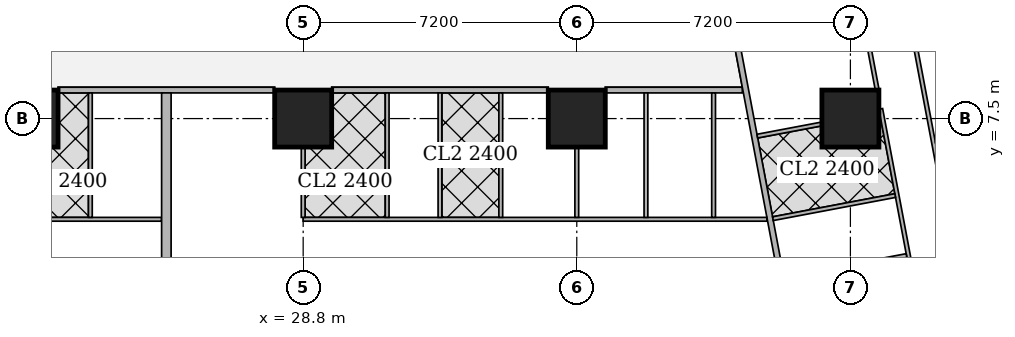
"""IFC4 building model, lengths in metres.
Left out: names, types, materials, properties, quantities, classifications, styles, units other than length and angle.
Written with IfcOpenShell. Run it as: python <this file> out.ifc"""

import sys

from ifc_helpers import new_model, si_unit, direction, frame, frame_2d, origin, origin_2d, place, context, subcontext, project, spatial, rectangle, extrude, element, fill, save


model = new_model("IFC4")
c1 = context("Model", 3, precision=1e-05, world=origin(), true_north=direction((0.0, 1.0)))
c2 = subcontext(c1, "Body", "Model", "MODEL_VIEW")
j1 = project(units=[si_unit("LENGTHUNIT", "METRE"), si_unit("PLANEANGLEUNIT", "RADIAN")], contexts=[c1])
p1 = place(None, origin())
s1 = spatial("IfcSite", under=j1, at=p1, CompositionType="ELEMENT")
p2 = place(p1, origin())
s2 = spatial("IfcBuilding", under=s1, at=p2, CompositionType="ELEMENT")
p3 = place(p2, frame((0.0, 0.0, 147.05)))
s3 = spatial("IfcBuildingStorey", under=s2, at=p3, CompositionType="ELEMENT", Elevation=147.05)
for number, where, z_axis, x_axis in (
    (1, (21.6, 7.5, 0.0), (0.0, 0.0, 1.0), (1.0, 0.0, 0.0)),
    (2, (28.8, 7.5, 0.0), (0.0, 0.0, 1.0), (1.0, 0.0, 0.0)),
    (3, (36.0, 7.5, 0.0), (0.0, 0.0, 1.0), (1.0, 0.0, 0.0)),
    (4, (43.2, 7.5, 0.0), (0.0, 0.0, 1.0), (1.0, 0.0, 0.0)),
):
    element("IfcColumn", number, at=place(p3, frame(where, z_axis=z_axis, x_axis=x_axis)), inside=s3, PredefinedType="COLUMN", context=c2, shape_type="SweptSolid", body=[
        extrude(rectangle(XDim=1.5, YDim=1.5, at=origin_2d()), origin(), (0.0, 0.0, 1.0), 3.75),
    ])
p4 = place(p3, frame((50.653, 2.703, 0.0), z_axis=(0.0, 0.0, 1.0), x_axis=(-0.185612026696, 0.982623109613, 0.0)))
e5 = element("IfcWall", 5, at=p4, inside=s3, PredefinedType="SOLIDWALL", context=c2, shape_type="SweptSolid", body=[
    extrude(rectangle(XDim=41.393, YDim=0.2, at=frame_2d((20.697, 0.0))), origin(), (0.0, 0.0, 1.0), 3.5),
])
p5 = place(p4, frame((1.633, 0.0, 0.9)))
e6 = element("IfcOpeningElement", 6, at=p5, cuts=e5, PredefinedType="OPENING", context=c2, shape_type="SweptSolid", body=[
    extrude(rectangle(XDim=1.8, YDim=1.5, at=frame_2d((0.9, 0.75))), frame((0.0, 0.11, 0.0), z_axis=(0.0, -1.0, 0.0), x_axis=(1.0, 0.0, 0.0)), (0.0, 0.0, 1.0), 0.22),
])
p6 = place(p4, frame((6.032, 0.0, 0.9)))
e7 = element("IfcOpeningElement", 7, at=p6, cuts=e5, PredefinedType="OPENING", context=c2, shape_type="SweptSolid", body=[
    extrude(rectangle(XDim=1.8, YDim=1.5, at=frame_2d((0.9, 0.75))), frame((0.0, 0.11, 0.0), z_axis=(0.0, -1.0, 0.0), x_axis=(1.0, 0.0, 0.0)), (0.0, 0.0, 1.0), 0.22),
])
p7 = place(p4, frame((9.848, 0.0, 0.9)))
e8 = element("IfcOpeningElement", 8, at=p7, cuts=e5, PredefinedType="OPENING", context=c2, shape_type="SweptSolid", body=[
    extrude(rectangle(XDim=1.8, YDim=1.5, at=frame_2d((0.9, 0.75))), frame((0.0, 0.11, 0.0), z_axis=(0.0, -1.0, 0.0), x_axis=(1.0, 0.0, 0.0)), (0.0, 0.0, 1.0), 0.22),
])
p8 = place(p4, frame((13.664, 0.0, 0.9)))
e9 = element("IfcOpeningElement", 9, at=p8, cuts=e5, PredefinedType="OPENING", context=c2, shape_type="SweptSolid", body=[
    extrude(rectangle(XDim=1.8, YDim=1.5, at=frame_2d((0.9, 0.75))), frame((0.0, 0.11, 0.0), z_axis=(0.0, -1.0, 0.0), x_axis=(1.0, 0.0, 0.0)), (0.0, 0.0, 1.0), 0.22),
])
p9 = place(p4, frame((17.481, 0.0, 0.9)))
e10 = element("IfcOpeningElement", 10, at=p9, cuts=e5, PredefinedType="OPENING", context=c2, shape_type="SweptSolid", body=[
    extrude(rectangle(XDim=1.8, YDim=1.5, at=frame_2d((0.9, 0.75))), frame((0.0, 0.11, 0.0), z_axis=(0.0, -1.0, 0.0), x_axis=(1.0, 0.0, 0.0)), (0.0, 0.0, 1.0), 0.22),
])
p10 = place(p4, frame((21.297, 0.0, 0.9)))
e11 = element("IfcOpeningElement", 11, at=p10, cuts=e5, PredefinedType="OPENING", context=c2, shape_type="SweptSolid", body=[
    extrude(rectangle(XDim=1.8, YDim=1.5, at=frame_2d((0.9, 0.75))), frame((0.0, 0.11, 0.0), z_axis=(0.0, -1.0, 0.0), x_axis=(1.0, 0.0, 0.0)), (0.0, 0.0, 1.0), 0.22),
])
p11 = place(p4, frame((25.113, 0.0, 0.9)))
e12 = element("IfcOpeningElement", 12, at=p11, cuts=e5, PredefinedType="OPENING", context=c2, shape_type="SweptSolid", body=[
    extrude(rectangle(XDim=1.8, YDim=1.5, at=frame_2d((0.9, 0.75))), frame((0.0, 0.11, 0.0), z_axis=(0.0, -1.0, 0.0), x_axis=(1.0, 0.0, 0.0)), (0.0, 0.0, 1.0), 0.22),
])
p12 = place(p4, frame((28.93, 0.0, 0.9)))
e13 = element("IfcOpeningElement", 13, at=p12, cuts=e5, PredefinedType="OPENING", context=c2, shape_type="SweptSolid", body=[
    extrude(rectangle(XDim=1.8, YDim=1.5, at=frame_2d((0.9, 0.75))), frame((0.0, 0.11, 0.0), z_axis=(0.0, -1.0, 0.0), x_axis=(1.0, 0.0, 0.0)), (0.0, 0.0, 1.0), 0.22),
])
p13 = place(p4, frame((32.746, 0.0, 0.9)))
e14 = element("IfcOpeningElement", 14, at=p13, cuts=e5, PredefinedType="OPENING", context=c2, shape_type="SweptSolid", body=[
    extrude(rectangle(XDim=1.8, YDim=1.5, at=frame_2d((0.9, 0.75))), frame((0.0, 0.11, 0.0), z_axis=(0.0, -1.0, 0.0), x_axis=(1.0, 0.0, 0.0)), (0.0, 0.0, 1.0), 0.22),
])
p14 = place(p4, frame((36.481, 0.0, 0.9)))
e15 = element("IfcOpeningElement", 15, at=p14, cuts=e5, PredefinedType="OPENING", context=c2, shape_type="SweptSolid", body=[
    extrude(rectangle(XDim=1.8, YDim=1.5, at=frame_2d((0.9, 0.75))), frame((0.0, 0.11, 0.0), z_axis=(0.0, -1.0, 0.0), x_axis=(1.0, 0.0, 0.0)), (0.0, 0.0, 1.0), 0.22),
])
p15 = place(p3, frame((40.356, 8.25, 0.0), z_axis=(0.0, 0.0, 1.0), x_axis=(-1.0, 0.0, 0.0)))
e16 = element("IfcWall", 16, at=p15, inside=s3, PredefinedType="SOLIDWALL", context=c2, shape_type="SweptSolid", body=[
    extrude(rectangle(XDim=3.605, YDim=0.15, at=frame_2d((1.802, 0.0))), origin(), (0.0, 0.0, 1.0), 3.5),
])
p16 = place(p3, frame((35.249, 8.25, 0.0), z_axis=(0.0, 0.0, 1.0), x_axis=(-1.0, 0.0, 0.0)))
e17 = element("IfcWall", 17, at=p16, inside=s3, PredefinedType="SOLIDWALL", context=c2, shape_type="SweptSolid", body=[
    extrude(rectangle(XDim=5.698, YDim=0.15, at=frame_2d((2.849, 0.0))), origin(), (0.0, 0.0, 1.0), 3.5),
])
p17 = place(p3, frame((28.049, 8.25, 0.0), z_axis=(0.0, 0.0, 1.0), x_axis=(-1.0, 0.0, 0.0)))
e18 = element("IfcWall", 18, at=p17, inside=s3, PredefinedType="SOLIDWALL", context=c2, shape_type="SweptSolid", body=[
    extrude(rectangle(XDim=5.698, YDim=0.15, at=frame_2d((2.849, 0.0))), origin(), (0.0, 0.0, 1.0), 3.5),
])
p18 = place(p17, frame((0.749, 0.0, 0.0)))
e19 = element("IfcOpeningElement", 19, at=p18, cuts=e18, PredefinedType="OPENING", context=c2, shape_type="SweptSolid", body=[
    extrude(rectangle(XDim=1.0, YDim=2.1, at=frame_2d((0.5, 1.05))), frame((0.0, 0.085, 0.0), z_axis=(0.0, -1.0, 0.0), x_axis=(1.0, 0.0, 0.0)), (0.0, 0.0, 1.0), 0.17),
])
p19 = place(p3, frame((33.877, 43.029, 0.0), z_axis=(0.0, 0.0, 1.0), x_axis=(0.185596841028, -0.98262597798, 0.0)))
e20 = element("IfcWall", 20, at=p19, inside=s3, PredefinedType="SOLIDWALL", context=c2, shape_type="SweptSolid", body=[
    extrude(rectangle(XDim=41.66, YDim=0.15, at=frame_2d((20.83, 0.0))), origin(), (0.0, 0.0, 1.0), 2.5),
])
p20 = place(p19, frame((12.57, 0.0, 0.0)))
e21 = element("IfcOpeningElement", 21, at=p20, cuts=e20, PredefinedType="OPENING", context=c2, shape_type="SweptSolid", body=[
    extrude(rectangle(XDim=1.0, YDim=2.1, at=frame_2d((0.5, 1.05))), frame((0.0, 0.085, 0.0), z_axis=(0.0, -1.0, 0.0), x_axis=(1.0, 0.0, 0.0)), (0.0, 0.0, 1.0), 0.17),
])
p21 = place(p19, frame((16.386, 0.0, 0.0)))
e22 = element("IfcOpeningElement", 22, at=p21, cuts=e20, PredefinedType="OPENING", context=c2, shape_type="SweptSolid", body=[
    extrude(rectangle(XDim=1.0, YDim=2.1, at=frame_2d((0.5, 1.05))), frame((0.0, 0.085, 0.0), z_axis=(0.0, -1.0, 0.0), x_axis=(1.0, 0.0, 0.0)), (0.0, 0.0, 1.0), 0.17),
])
p22 = place(p19, frame((31.166, 0.0, 0.0)))
e23 = element("IfcOpeningElement", 23, at=p22, cuts=e20, PredefinedType="OPENING", context=c2, shape_type="SweptSolid", body=[
    extrude(rectangle(XDim=1.0, YDim=2.1, at=frame_2d((0.5, 1.05))), frame((0.0, 0.085, 0.0), z_axis=(0.0, -1.0, 0.0), x_axis=(1.0, 0.0, 0.0)), (0.0, 0.0, 1.0), 0.17),
])
p23 = place(p3, frame((25.075, 4.85, 0.0), z_axis=(0.0, 0.0, 1.0), x_axis=(-1.0, 0.0, 0.0)))
e24 = element("IfcWall", 24, at=p23, inside=s3, PredefinedType="PARTITIONING", context=c2, shape_type="SweptSolid", body=[
    extrude(rectangle(XDim=7.075, YDim=0.1, at=frame_2d((3.538, 0.0))), origin(), (0.0, 0.0, 1.0), 3.5),
])
p24 = place(p23, frame((5.52, 0.0, 0.0)))
e25 = element("IfcOpeningElement", 25, at=p24, cuts=e24, PredefinedType="OPENING", context=c2, shape_type="SweptSolid", body=[
    extrude(rectangle(XDim=0.9, YDim=2.1, at=frame_2d((0.45, 1.05))), frame((0.0, 0.06, 0.0), z_axis=(0.0, -1.0, 0.0), x_axis=(1.0, 0.0, 0.0)), (0.0, 0.0, 1.0), 0.12),
])
p25 = place(p23, frame((2.225, 0.0, 0.0)))
e26 = element("IfcOpeningElement", 26, at=p25, cuts=e24, PredefinedType="OPENING", context=c2, shape_type="SweptSolid", body=[
    extrude(rectangle(XDim=0.9, YDim=2.1, at=frame_2d((0.45, 1.05))), frame((0.0, 0.06, 0.0), z_axis=(0.0, -1.0, 0.0), x_axis=(1.0, 0.0, 0.0)), (0.0, 0.0, 1.0), 0.12),
])
p26 = place(p23, frame((3.72, 0.0, 0.0)))
e27 = element("IfcOpeningElement", 27, at=p26, cuts=e24, PredefinedType="OPENING", context=c2, shape_type="SweptSolid", body=[
    extrude(rectangle(XDim=0.9, YDim=2.1, at=frame_2d((0.45, 1.05))), frame((0.0, 0.06, 0.0), z_axis=(0.0, -1.0, 0.0), x_axis=(1.0, 0.0, 0.0)), (0.0, 0.0, 1.0), 0.12),
])
p27 = place(p23, frame((0.425, 0.0, 0.0)))
e28 = element("IfcOpeningElement", 28, at=p27, cuts=e24, PredefinedType="OPENING", context=c2, shape_type="SweptSolid", body=[
    extrude(rectangle(XDim=0.9, YDim=2.1, at=frame_2d((0.45, 1.05))), frame((0.0, 0.06, 0.0), z_axis=(0.0, -1.0, 0.0), x_axis=(1.0, 0.0, 0.0)), (0.0, 0.0, 1.0), 0.12),
])
p28 = place(p3, frame((23.2, 4.9, 0.0), z_axis=(0.0, 0.0, 1.0), x_axis=(0.0, 1.0, 0.0)))
e29 = element("IfcWall", 29, at=p28, inside=s3, PredefinedType="PARTITIONING", context=c2, shape_type="SweptSolid", body=[
    extrude(rectangle(XDim=3.275, YDim=0.1, at=frame_2d((1.638, 0.0))), origin(), (0.0, 0.0, 1.0), 3.5),
])
p29 = place(p3, frame((41.002, 4.85, 0.0), z_axis=(0.0, 0.0, 1.0), x_axis=(-1.0, 0.0, 0.0)))
e30 = element("IfcWall", 30, at=p29, inside=s3, PredefinedType="PARTITIONING", context=c2, shape_type="SweptSolid", body=[
    extrude(rectangle(XDim=12.202, YDim=0.1, at=frame_2d((6.101, 0.0))), origin(), (0.0, 0.0, 1.0), 3.5),
])
p30 = place(p29, frame((10.647, 0.0, 0.0)))
e31 = element("IfcOpeningElement", 31, at=p30, cuts=e30, PredefinedType="OPENING", context=c2, shape_type="SweptSolid", body=[
    extrude(rectangle(XDim=0.9, YDim=2.1, at=frame_2d((0.45, 1.05))), frame((0.0, 0.06, 0.0), z_axis=(0.0, -1.0, 0.0), x_axis=(1.0, 0.0, 0.0)), (0.0, 0.0, 1.0), 0.12),
])
p31 = place(p29, frame((7.352, 0.0, 0.0)))
e32 = element("IfcOpeningElement", 32, at=p31, cuts=e30, PredefinedType="OPENING", context=c2, shape_type="SweptSolid", body=[
    extrude(rectangle(XDim=0.9, YDim=2.1, at=frame_2d((0.45, 1.05))), frame((0.0, 0.06, 0.0), z_axis=(0.0, -1.0, 0.0), x_axis=(1.0, 0.0, 0.0)), (0.0, 0.0, 1.0), 0.12),
])
p32 = place(p29, frame((3.642, 0.0, 0.0)))
e33 = element("IfcOpeningElement", 33, at=p32, cuts=e30, PredefinedType="OPENING", context=c2, shape_type="SweptSolid", body=[
    extrude(rectangle(XDim=0.9, YDim=2.1, at=frame_2d((0.45, 1.05))), frame((0.0, 0.06, 0.0), z_axis=(0.0, -1.0, 0.0), x_axis=(1.0, 0.0, 0.0)), (0.0, 0.0, 1.0), 0.12),
])
p33 = place(p29, frame((0.15, 0.0, 0.0)))
e34 = element("IfcOpeningElement", 34, at=p33, cuts=e30, PredefinedType="OPENING", context=c2, shape_type="SweptSolid", body=[
    extrude(rectangle(XDim=0.9, YDim=2.1, at=frame_2d((0.45, 1.05))), frame((0.0, 0.06, 0.0), z_axis=(0.0, -1.0, 0.0), x_axis=(1.0, 0.0, 0.0)), (0.0, 0.0, 1.0), 0.12),
])
p34 = place(p29, frame((8.847, 0.0, 0.0)))
e35 = element("IfcOpeningElement", 35, at=p34, cuts=e30, PredefinedType="OPENING", context=c2, shape_type="SweptSolid", body=[
    extrude(rectangle(XDim=0.9, YDim=2.1, at=frame_2d((0.45, 1.05))), frame((0.0, 0.06, 0.0), z_axis=(0.0, -1.0, 0.0), x_axis=(1.0, 0.0, 0.0)), (0.0, 0.0, 1.0), 0.12),
])
p35 = place(p29, frame((5.552, 0.0, 0.0)))
e36 = element("IfcOpeningElement", 36, at=p35, cuts=e30, PredefinedType="OPENING", context=c2, shape_type="SweptSolid", body=[
    extrude(rectangle(XDim=0.9, YDim=2.1, at=frame_2d((0.45, 1.05))), frame((0.0, 0.06, 0.0), z_axis=(0.0, -1.0, 0.0), x_axis=(1.0, 0.0, 0.0)), (0.0, 0.0, 1.0), 0.12),
])
p36 = place(p29, frame((1.842, 0.0, 0.0)))
e37 = element("IfcOpeningElement", 37, at=p36, cuts=e30, PredefinedType="OPENING", context=c2, shape_type="SweptSolid", body=[
    extrude(rectangle(XDim=0.9, YDim=2.1, at=frame_2d((0.45, 1.05))), frame((0.0, 0.06, 0.0), z_axis=(0.0, -1.0, 0.0), x_axis=(1.0, 0.0, 0.0)), (0.0, 0.0, 1.0), 0.12),
])
p37 = place(p3, frame((28.8, 4.9, 0.0), z_axis=(0.0, 0.0, 1.0), x_axis=(0.0, 1.0, 0.0)))
e38 = element("IfcWall", 38, at=p37, inside=s3, PredefinedType="PARTITIONING", context=c2, shape_type="SweptSolid", body=[
    extrude(rectangle(XDim=1.849, YDim=0.1, at=frame_2d((0.925, 0.0))), origin(), (0.0, 0.0, 1.0), 3.5),
])
p38 = place(p3, frame((32.4, 4.9, 0.0), z_axis=(0.0, 0.0, 1.0), x_axis=(0.0, 1.0, 0.0)))
e39 = element("IfcWall", 39, at=p38, inside=s3, PredefinedType="PARTITIONING", context=c2, shape_type="SweptSolid", body=[
    extrude(rectangle(XDim=3.275, YDim=0.1, at=frame_2d((1.638, 0.0))), origin(), (0.0, 0.0, 1.0), 3.5),
])
p39 = place(p3, frame((36.0, 4.9, 0.0), z_axis=(0.0, 0.0, 1.0), x_axis=(0.0, 1.0, 0.0)))
e40 = element("IfcWall", 40, at=p39, inside=s3, PredefinedType="PARTITIONING", context=c2, shape_type="SweptSolid", body=[
    extrude(rectangle(XDim=1.849, YDim=0.1, at=frame_2d((0.925, 0.0))), origin(), (0.0, 0.0, 1.0), 3.5),
])
for number, where, z_axis, x_axis in (
    (41, (39.6, 4.9, 0.0), (0.0, 0.0, 1.0), (0.0, 1.0, 0.0)),
    (42, (31.01, 4.9, 0.0), (0.0, 0.0, 1.0), (0.0, 1.0, 0.0)),
    (43, (34.0, 4.9, 0.0), (0.0, 0.0, 1.0), (0.0, 1.0, 0.0)),
    (44, (37.82, 4.9, 0.0), (0.0, 0.0, 1.0), (0.0, 1.0, 0.0)),
):
    element("IfcWall", number, at=place(p3, frame(where, z_axis=z_axis, x_axis=x_axis)), inside=s3, PredefinedType="PARTITIONING", context=c2, shape_type="SweptSolid", body=[
        extrude(rectangle(XDim=3.275, YDim=0.1, at=frame_2d((1.638, 0.0))), origin(), (0.0, 0.0, 1.0), 3.5),
    ])
p40 = place(p3, frame((25.2, 3.65, 0.0), z_axis=(0.0, 0.0, 1.0), x_axis=(0.0, 1.0, 0.0)))
e45 = element("IfcWall", 45, at=p40, inside=s3, PredefinedType="SOLIDWALL", context=c2, shape_type="SweptSolid", body=[
    extrude(rectangle(XDim=4.525, YDim=0.25, at=frame_2d((2.263, 0.0))), origin(), (0.0, 0.0, 1.0), 3.5),
])
p41 = place(p3, frame((44.727, 10.366, 0.0), z_axis=(0.0, 0.0, 1.0), x_axis=(0.185578957652, -0.982629355595, 0.0)))
e46 = element("IfcWall", 46, at=p41, inside=s3, PredefinedType="PARTITIONING", context=c2, shape_type="SweptSolid", body=[
    extrude(rectangle(XDim=7.721, YDim=0.1, at=frame_2d((3.86, 0.0))), origin(), (0.0, 0.0, 1.0), 3.5),
])
p42 = place(p41, frame((0.151, 0.0, 0.0)))
e47 = element("IfcOpeningElement", 47, at=p42, cuts=e46, PredefinedType="OPENING", context=c2, shape_type="SweptSolid", body=[
    extrude(rectangle(XDim=0.9, YDim=2.1, at=frame_2d((0.45, 1.05))), frame((0.0, 0.06, 0.0), z_axis=(0.0, -1.0, 0.0), x_axis=(1.0, 0.0, 0.0)), (0.0, 0.0, 1.0), 0.12),
])
p43 = place(p41, frame((3.806, 0.0, 0.0)))
e48 = element("IfcOpeningElement", 48, at=p43, cuts=e46, PredefinedType="OPENING", context=c2, shape_type="SweptSolid", body=[
    extrude(rectangle(XDim=0.9, YDim=2.1, at=frame_2d((0.45, 1.05))), frame((0.0, 0.06, 0.0), z_axis=(0.0, -1.0, 0.0), x_axis=(1.0, 0.0, 0.0)), (0.0, 0.0, 1.0), 0.12),
])
p44 = place(p3, frame((43.539, 10.192, 0.0), z_axis=(0.0, 0.0, 1.0), x_axis=(0.18564540894, -0.982616803306, 0.0)))
e49 = element("IfcWall", 49, at=p44, inside=s3, PredefinedType="PARTITIONING", context=c2, shape_type="SweptSolid", body=[
    extrude(rectangle(XDim=1.966, YDim=0.1, at=frame_2d((0.983, 0.0))), origin(), (0.0, 0.0, 1.0), 3.5),
])
p45 = place(p3, frame((43.999, 7.755, 0.0), z_axis=(0.0, 0.0, 1.0), x_axis=(0.185565904578, -0.982631820703, 0.0)))
e50 = element("IfcWall", 50, at=p45, inside=s3, PredefinedType="PARTITIONING", context=c2, shape_type="SweptSolid", body=[
    extrude(rectangle(XDim=5.319, YDim=0.1, at=frame_2d((2.66, 0.0))), origin(), (0.0, 0.0, 1.0), 3.5),
])
p46 = place(p45, frame((1.0, 0.0, 0.0)))
e51 = element("IfcOpeningElement", 51, at=p46, cuts=e50, PredefinedType="OPENING", context=c2, shape_type="SweptSolid", body=[
    extrude(rectangle(XDim=0.9, YDim=2.1, at=frame_2d((0.45, 1.05))), frame((0.0, 0.06, 0.0), z_axis=(0.0, -1.0, 0.0), x_axis=(1.0, 0.0, 0.0)), (0.0, 0.0, 1.0), 0.12),
])
p47 = place(p45, frame((4.269, 0.0, 0.0)))
e52 = element("IfcOpeningElement", 52, at=p47, cuts=e50, PredefinedType="OPENING", context=c2, shape_type="SweptSolid", body=[
    extrude(rectangle(XDim=0.9, YDim=2.1, at=frame_2d((0.45, 1.05))), frame((0.0, 0.06, 0.0), z_axis=(0.0, -1.0, 0.0), x_axis=(1.0, 0.0, 0.0)), (0.0, 0.0, 1.0), 0.12),
])
p48 = place(p45, frame((2.665, 0.0, 0.0)))
e53 = element("IfcOpeningElement", 53, at=p48, cuts=e50, PredefinedType="OPENING", context=c2, shape_type="SweptSolid", body=[
    extrude(rectangle(XDim=0.9, YDim=2.1, at=frame_2d((0.45, 1.05))), frame((0.0, 0.06, 0.0), z_axis=(0.0, -1.0, 0.0), x_axis=(1.0, 0.0, 0.0)), (0.0, 0.0, 1.0), 0.12),
])
p49 = place(p3, frame((42.44, 7.357, 0.0), z_axis=(0.0, 0.0, 1.0), x_axis=(-0.982643094077, -0.185506198448, 0.0)))
e54 = element("IfcWall", 54, at=p49, inside=s3, PredefinedType="PARTITIONING", context=c2, shape_type="SweptSolid", body=[
    extrude(rectangle(XDim=1.719, YDim=0.1, at=frame_2d((0.859, 0.0))), origin(), (0.0, 0.0, 1.0), 3.5),
])
p50 = place(p3, frame((44.677, 3.896, 0.0), z_axis=(0.0, 0.0, 1.0), x_axis=(-0.982610347627, -0.185679575441, 0.0)))
e55 = element("IfcWall", 55, at=p50, inside=s3, PredefinedType="PARTITIONING", context=c2, shape_type="SweptSolid", body=[
    extrude(rectangle(XDim=3.274, YDim=0.1, at=frame_2d((1.637, 0.0))), origin(), (0.0, 0.0, 1.0), 3.5),
])
p51 = place(p3, frame((44.379, 5.474, 0.0), z_axis=(0.0, 0.0, 1.0), x_axis=(-0.982607026909, -0.185697147715, 0.0)))
e56 = element("IfcWall", 56, at=p51, inside=s3, PredefinedType="PARTITIONING", context=c2, shape_type="SweptSolid", body=[
    extrude(rectangle(XDim=3.275, YDim=0.1, at=frame_2d((1.637, 0.0))), origin(), (0.0, 0.0, 1.0), 3.5),
])
p52 = place(p25, origin())
e57 = element("IfcDoor", 57, at=p52, inside=s3, OperationType="SINGLE_SWING_LEFT", PredefinedType="DOOR", context=c2, shape_type="SweptSolid", body=[
    extrude(rectangle(XDim=0.9, YDim=2.1, at=frame_2d((0.45, 1.05))), frame((0.0, 0.025, 0.0), z_axis=(0.0, -1.0, 0.0), x_axis=(1.0, 0.0, 0.0)), (0.0, 0.0, 1.0), 0.05),
])
fill(e26, e57)
p53 = place(p27, origin())
e58 = element("IfcDoor", 58, at=p53, inside=s3, OperationType="SINGLE_SWING_RIGHT", PredefinedType="DOOR", context=c2, shape_type="SweptSolid", body=[
    extrude(rectangle(XDim=0.9, YDim=2.1, at=frame_2d((0.45, 1.05))), frame((0.0, 0.025, 0.0), z_axis=(0.0, -1.0, 0.0), x_axis=(1.0, 0.0, 0.0)), (0.0, 0.0, 1.0), 0.05),
])
fill(e28, e58)
p54 = place(p30, origin())
e59 = element("IfcDoor", 59, at=p54, inside=s3, OperationType="SINGLE_SWING_LEFT", PredefinedType="DOOR", context=c2, shape_type="SweptSolid", body=[
    extrude(rectangle(XDim=0.9, YDim=2.1, at=frame_2d((0.45, 1.05))), frame((0.0, 0.025, 0.0), z_axis=(0.0, -1.0, 0.0), x_axis=(1.0, 0.0, 0.0)), (0.0, 0.0, 1.0), 0.05),
])
fill(e31, e59)
p55 = place(p31, origin())
e60 = element("IfcDoor", 60, at=p55, inside=s3, OperationType="SINGLE_SWING_LEFT", PredefinedType="DOOR", context=c2, shape_type="SweptSolid", body=[
    extrude(rectangle(XDim=0.9, YDim=2.1, at=frame_2d((0.45, 1.05))), frame((0.0, 0.025, 0.0), z_axis=(0.0, -1.0, 0.0), x_axis=(1.0, 0.0, 0.0)), (0.0, 0.0, 1.0), 0.05),
])
fill(e32, e60)
p56 = place(p32, origin())
e61 = element("IfcDoor", 61, at=p56, inside=s3, OperationType="SINGLE_SWING_LEFT", PredefinedType="DOOR", context=c2, shape_type="SweptSolid", body=[
    extrude(rectangle(XDim=0.9, YDim=2.1, at=frame_2d((0.45, 1.05))), frame((0.0, 0.025, 0.0), z_axis=(0.0, -1.0, 0.0), x_axis=(1.0, 0.0, 0.0)), (0.0, 0.0, 1.0), 0.05),
])
fill(e33, e61)
p57 = place(p33, origin())
e62 = element("IfcDoor", 62, at=p57, inside=s3, OperationType="SINGLE_SWING_RIGHT", PredefinedType="DOOR", context=c2, shape_type="SweptSolid", body=[
    extrude(rectangle(XDim=0.9, YDim=2.1, at=frame_2d((0.45, 1.05))), frame((0.0, 0.025, 0.0), z_axis=(0.0, -1.0, 0.0), x_axis=(1.0, 0.0, 0.0)), (0.0, 0.0, 1.0), 0.05),
])
fill(e34, e62)
p58 = place(p34, origin())
e63 = element("IfcDoor", 63, at=p58, inside=s3, OperationType="SINGLE_SWING_RIGHT", PredefinedType="DOOR", context=c2, shape_type="SweptSolid", body=[
    extrude(rectangle(XDim=0.9, YDim=2.1, at=frame_2d((0.45, 1.05))), frame((0.0, 0.025, 0.0), z_axis=(0.0, -1.0, 0.0), x_axis=(1.0, 0.0, 0.0)), (0.0, 0.0, 1.0), 0.05),
])
fill(e35, e63)
p59 = place(p35, origin())
e64 = element("IfcDoor", 64, at=p59, inside=s3, OperationType="SINGLE_SWING_RIGHT", PredefinedType="DOOR", context=c2, shape_type="SweptSolid", body=[
    extrude(rectangle(XDim=0.9, YDim=2.1, at=frame_2d((0.45, 1.05))), frame((0.0, 0.025, 0.0), z_axis=(0.0, -1.0, 0.0), x_axis=(1.0, 0.0, 0.0)), (0.0, 0.0, 1.0), 0.05),
])
fill(e36, e64)
p60 = place(p36, origin())
e65 = element("IfcDoor", 65, at=p60, inside=s3, OperationType="SINGLE_SWING_RIGHT", PredefinedType="DOOR", context=c2, shape_type="SweptSolid", body=[
    extrude(rectangle(XDim=0.9, YDim=2.1, at=frame_2d((0.45, 1.05))), frame((0.0, 0.025, 0.0), z_axis=(0.0, -1.0, 0.0), x_axis=(1.0, 0.0, 0.0)), (0.0, 0.0, 1.0), 0.05),
])
fill(e37, e65)
p61 = place(p18, origin())
e66 = element("IfcDoor", 66, at=p61, inside=s3, OperationType="SINGLE_SWING_LEFT", PredefinedType="DOOR", context=c2, shape_type="SweptSolid", body=[
    extrude(rectangle(XDim=1.0, YDim=2.1, at=frame_2d((0.5, 1.05))), frame((0.0, 0.025, 0.0), z_axis=(0.0, -1.0, 0.0), x_axis=(1.0, 0.0, 0.0)), (0.0, 0.0, 1.0), 0.05),
])
fill(e19, e66)
p62 = place(p43, origin())
e67 = element("IfcDoor", 67, at=p62, inside=s3, OperationType="SINGLE_SWING_LEFT", PredefinedType="DOOR", context=c2, shape_type="SweptSolid", body=[
    extrude(rectangle(XDim=0.9, YDim=2.1, at=frame_2d((0.45, 1.05))), frame((0.0, 0.025, 0.0), z_axis=(0.0, -1.0, 0.0), x_axis=(1.0, 0.0, 0.0)), (0.0, 0.0, 1.0), 0.05),
])
fill(e48, e67)
p63 = place(p46, origin())
e68 = element("IfcDoor", 68, at=p63, inside=s3, OperationType="SINGLE_SWING_LEFT", PredefinedType="DOOR", context=c2, shape_type="SweptSolid", body=[
    extrude(rectangle(XDim=0.9, YDim=2.1, at=frame_2d((0.45, 1.05))), frame((0.0, 0.025, 0.0), z_axis=(0.0, -1.0, 0.0), x_axis=(1.0, 0.0, 0.0)), (0.0, 0.0, 1.0), 0.05),
])
fill(e51, e68)
p64 = place(p48, origin())
e69 = element("IfcDoor", 69, at=p64, inside=s3, OperationType="SINGLE_SWING_RIGHT", PredefinedType="DOOR", context=c2, shape_type="SweptSolid", body=[
    extrude(rectangle(XDim=0.9, YDim=2.1, at=frame_2d((0.45, 1.05))), frame((0.0, 0.025, 0.0), z_axis=(0.0, -1.0, 0.0), x_axis=(1.0, 0.0, 0.0)), (0.0, 0.0, 1.0), 0.05),
])
fill(e53, e69)
save(model, sys.argv[1])
